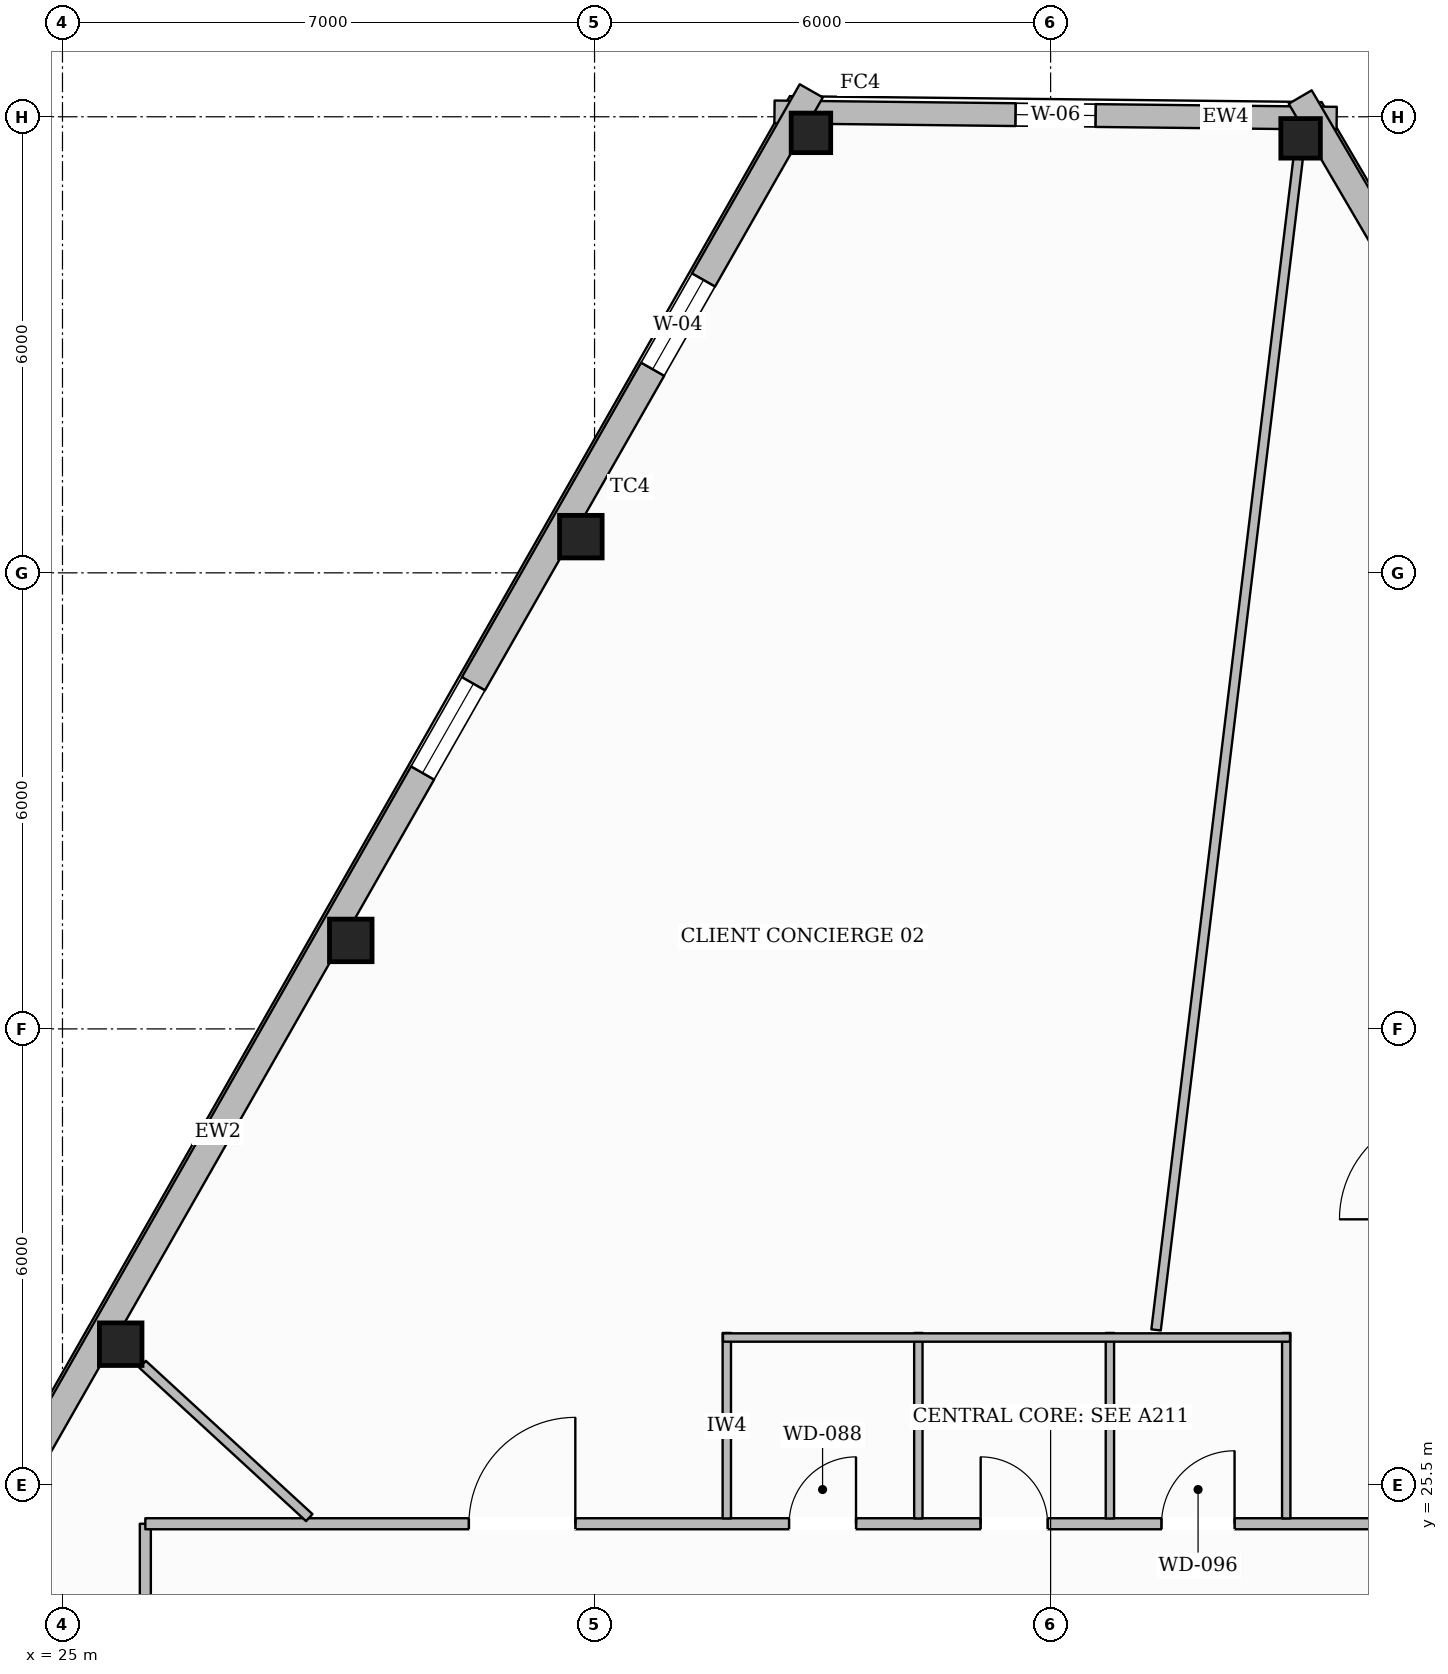
"""IFC4 building model, lengths in metres.
Left out: names, types, materials, properties, quantities, classifications, styles, units other than length and angle.
Written with IfcOpenShell. Run it as: python <this file> out.ifc"""

import sys

from ifc_helpers import new_model, si_unit, direction, frame, frame_2d, origin, origin_2d, place, context, subcontext, project, spatial, rectangle, hollow_rectangle, extrude, element, fill, save


model = new_model("IFC4")
c1 = context("Model", 3, precision=1e-05, world=origin(), true_north=direction((0.0, 1.0)))
c2 = subcontext(c1, "Body", "Model", "MODEL_VIEW")
j1 = project(units=[si_unit("LENGTHUNIT", "METRE"), si_unit("PLANEANGLEUNIT", "RADIAN")], contexts=[c1])
p1 = place(None, origin())
s1 = spatial("IfcSite", under=j1, at=p1, CompositionType="ELEMENT")
p2 = place(p1, origin())
s2 = spatial("IfcBuilding", under=s1, at=p2, CompositionType="ELEMENT")
p3 = place(p2, frame((0.0, 0.0, 258.75)))
s3 = spatial("IfcBuildingStorey", under=s2, at=p3, CompositionType="ELEMENT", Elevation=258.75)
p4 = place(p3, frame((34.847, 43.288, 0.0), z_axis=(0.0, 0.0, 1.0), x_axis=(1.0, 0.0, 0.0)))
e1 = element("IfcColumn", 1, at=p4, inside=s3, PredefinedType="COLUMN", context=c2, shape_type="SweptSolid", body=[
    extrude(hollow_rectangle(XDim=0.52, YDim=0.52, WallThickness=0.024, at=origin_2d()), origin(), (0.0, 0.0, 1.0), 3.61),
])
for number, where, z_axis, x_axis in (
    (2, (31.82, 37.976, 0.0), (0.0, 0.0, 1.0), (1.0, 0.0, 0.0)),
    (3, (28.793, 32.664, 0.0), (0.0, 0.0, 1.0), (1.0, 0.0, 0.0)),
    (4, (25.766, 27.352, 0.0), (0.0, 0.0, 1.0), (1.0, 0.0, 0.0)),
):
    element("IfcColumn", number, at=place(p3, frame(where, z_axis=z_axis, x_axis=x_axis)), inside=s3, PredefinedType="COLUMN", context=c2, shape_type="SweptSolid", body=[
        extrude(hollow_rectangle(XDim=0.56, YDim=0.56, WallThickness=0.025, at=origin_2d()), origin(), (0.0, 0.0, 1.0), 3.61),
    ])
p5 = place(p3, frame((41.289, 43.216, 0.0), z_axis=(0.0, 0.0, 1.0), x_axis=(1.0, 0.0, 0.0)))
e5 = element("IfcColumn", 5, at=p5, inside=s3, PredefinedType="COLUMN", context=c2, shape_type="SweptSolid", body=[
    extrude(hollow_rectangle(XDim=0.52, YDim=0.52, WallThickness=0.024, at=origin_2d()), origin(), (0.0, 0.0, 1.0), 3.61),
])
p6 = place(p3, frame((34.367, 43.564, 0.0), z_axis=(0.0, 0.0, 1.0), x_axis=(0.999937028375, -0.011222267359, 0.0)))
e6 = element("IfcWall", 6, at=p6, inside=s3, PredefinedType="STANDARD", context=c2, shape_type="SweptSolid", body=[
    extrude(rectangle(XDim=7.397, YDim=0.3, at=frame_2d((3.698, 0.0))), origin(), (0.0, 0.0, 1.0), 3.196),
])
p7 = place(p6, frame((3.173, 0.0, 0.65)))
e7 = element("IfcOpeningElement", 7, at=p7, cuts=e6, PredefinedType="OPENING", context=c2, shape_type="SweptSolid", body=[
    extrude(rectangle(XDim=1.05, YDim=1.7, at=frame_2d((0.525, 0.85))), frame((0.0, 0.16, 0.0), z_axis=(0.0, -1.0, 0.0), x_axis=(1.0, 0.0, 0.0)), (0.0, 0.0, 1.0), 0.32),
])
p8 = place(p3, frame((16.214, 11.135, 0.0), z_axis=(0.0, 0.0, 1.0), x_axis=(0.49510347201, 0.868834018673, 0.0)))
e8 = element("IfcWall", 8, at=p8, inside=s3, PredefinedType="STANDARD", context=c2, shape_type="SweptSolid", body=[
    extrude(rectangle(XDim=37.643, YDim=0.35, at=frame_2d((18.822, 0.0))), origin(), (0.0, 0.0, 1.0), 3.196),
])
p9 = place(p8, frame((33.429, 0.0, 0.65)))
e9 = element("IfcOpeningElement", 9, at=p9, cuts=e8, PredefinedType="OPENING", context=c2, shape_type="SweptSolid", body=[
    extrude(rectangle(XDim=1.35, YDim=1.75, at=frame_2d((0.675, 0.875))), frame((0.0, 0.185, 0.0), z_axis=(0.0, -1.0, 0.0), x_axis=(1.0, 0.0, 0.0)), (0.0, 0.0, 1.0), 0.37),
])
p10 = place(p8, frame((27.315, 0.0, 0.65)))
e10 = element("IfcOpeningElement", 10, at=p10, cuts=e8, PredefinedType="OPENING", context=c2, shape_type="SweptSolid", body=[
    extrude(rectangle(XDim=1.35, YDim=1.75, at=frame_2d((0.675, 0.875))), frame((0.0, 0.185, 0.0), z_axis=(0.0, -1.0, 0.0), x_axis=(1.0, 0.0, 0.0)), (0.0, 0.0, 1.0), 0.37),
])
p11 = place(p8, frame((15.087, 0.0, 0.65)))
e11 = element("IfcOpeningElement", 11, at=p11, cuts=e8, PredefinedType="OPENING", context=c2, shape_type="SweptSolid", body=[
    extrude(rectangle(XDim=1.35, YDim=1.75, at=frame_2d((0.675, 0.875))), frame((0.0, 0.185, 0.0), z_axis=(0.0, -1.0, 0.0), x_axis=(1.0, 0.0, 0.0)), (0.0, 0.0, 1.0), 0.37),
])
p12 = place(p8, frame((8.973, 0.0, 0.65)))
e12 = element("IfcOpeningElement", 12, at=p12, cuts=e8, PredefinedType="OPENING", context=c2, shape_type="SweptSolid", body=[
    extrude(rectangle(XDim=1.35, YDim=1.75, at=frame_2d((0.675, 0.875))), frame((0.0, 0.185, 0.0), z_axis=(0.0, -1.0, 0.0), x_axis=(1.0, 0.0, 0.0)), (0.0, 0.0, 1.0), 0.37),
])
p13 = place(p8, frame((2.859, 0.0, 0.65)))
e13 = element("IfcOpeningElement", 13, at=p13, cuts=e8, PredefinedType="OPENING", context=c2, shape_type="SweptSolid", body=[
    extrude(rectangle(XDim=1.35, YDim=1.75, at=frame_2d((0.675, 0.875))), frame((0.0, 0.185, 0.0), z_axis=(0.0, -1.0, 0.0), x_axis=(1.0, 0.0, 0.0)), (0.0, 0.0, 1.0), 0.37),
])
p14 = place(p3, frame((41.284, 43.76, 0.0), z_axis=(0.0, 0.0, 1.0), x_axis=(0.50479404613, -0.863239810824, 0.0)))
e14 = element("IfcWall", 14, at=p14, inside=s3, PredefinedType="STANDARD", context=c2, shape_type="SweptSolid", body=[
    extrude(rectangle(XDim=38.372, YDim=0.35, at=frame_2d((19.186, 0.0))), origin(), (0.0, 0.0, 1.0), 3.196),
])
p15 = place(p14, frame((34.102, 0.0, 0.65)))
e15 = element("IfcOpeningElement", 15, at=p15, cuts=e14, PredefinedType="OPENING", context=c2, shape_type="SweptSolid", body=[
    extrude(rectangle(XDim=1.35, YDim=1.75, at=frame_2d((0.675, 0.875))), frame((0.0, 0.185, 0.0), z_axis=(0.0, -1.0, 0.0), x_axis=(1.0, 0.0, 0.0)), (0.0, 0.0, 1.0), 0.37),
])
p16 = place(p14, frame((27.864, 0.0, 0.65)))
e16 = element("IfcOpeningElement", 16, at=p16, cuts=e14, PredefinedType="OPENING", context=c2, shape_type="SweptSolid", body=[
    extrude(rectangle(XDim=1.35, YDim=1.75, at=frame_2d((0.675, 0.875))), frame((0.0, 0.185, 0.0), z_axis=(0.0, -1.0, 0.0), x_axis=(1.0, 0.0, 0.0)), (0.0, 0.0, 1.0), 0.37),
])
p17 = place(p14, frame((15.39, 0.0, 0.65)))
e17 = element("IfcOpeningElement", 17, at=p17, cuts=e14, PredefinedType="OPENING", context=c2, shape_type="SweptSolid", body=[
    extrude(rectangle(XDim=1.35, YDim=1.75, at=frame_2d((0.675, 0.875))), frame((0.0, 0.185, 0.0), z_axis=(0.0, -1.0, 0.0), x_axis=(1.0, 0.0, 0.0)), (0.0, 0.0, 1.0), 0.37),
])
p18 = place(p14, frame((9.153, 0.0, 0.65)))
e18 = element("IfcOpeningElement", 18, at=p18, cuts=e14, PredefinedType="OPENING", context=c2, shape_type="SweptSolid", body=[
    extrude(rectangle(XDim=1.35, YDim=1.75, at=frame_2d((0.675, 0.875))), frame((0.0, 0.185, 0.0), z_axis=(0.0, -1.0, 0.0), x_axis=(1.0, 0.0, 0.0)), (0.0, 0.0, 1.0), 0.37),
])
p19 = place(p14, frame((2.915, 0.0, 0.65)))
e19 = element("IfcOpeningElement", 19, at=p19, cuts=e14, PredefinedType="OPENING", context=c2, shape_type="SweptSolid", body=[
    extrude(rectangle(XDim=1.35, YDim=1.75, at=frame_2d((0.675, 0.875))), frame((0.0, 0.185, 0.0), z_axis=(0.0, -1.0, 0.0), x_axis=(1.0, 0.0, 0.0)), (0.0, 0.0, 1.0), 0.37),
])
p20 = place(p3, frame((26.09, 7.21, 0.0), z_axis=(0.0, 0.0, 1.0), x_axis=(0.0, 1.0, 0.0)))
e20 = element("IfcWall", 20, at=p20, inside=s3, PredefinedType="PARTITIONING", context=c2, shape_type="SweptSolid", body=[
    extrude(rectangle(XDim=17.78, YDim=0.145, at=frame_2d((8.89, 0.0))), origin(), (0.0, 0.0, 1.0), 3.349),
])
p21 = place(p20, frame((11.443, 0.0, 0.0)))
e21 = element("IfcOpeningElement", 21, at=p21, cuts=e20, PredefinedType="OPENING", context=c2, shape_type="SweptSolid", body=[
    extrude(rectangle(XDim=0.98, YDim=2.15, at=frame_2d((0.49, 1.075))), frame((0.0, 0.083, 0.0), z_axis=(0.0, -1.0, 0.0), x_axis=(1.0, 0.0, 0.0)), (0.0, 0.0, 1.0), 0.165),
])
p22 = place(p3, frame((26.09, 24.99, 0.0), z_axis=(0.0, 0.0, 1.0), x_axis=(1.0, 0.0, 0.0)))
e22 = element("IfcWall", 22, at=p22, inside=s3, PredefinedType="PARTITIONING", context=c2, shape_type="SweptSolid", body=[
    extrude(rectangle(XDim=17.11, YDim=0.145, at=frame_2d((8.555, 0.0))), origin(), (0.0, 0.0, 1.0), 3.61),
])
p23 = place(p22, frame((8.47, 0.0, 0.0)))
e23 = element("IfcOpeningElement", 23, at=p23, cuts=e22, PredefinedType="OPENING", context=c2, shape_type="SweptSolid", body=[
    extrude(rectangle(XDim=0.88, YDim=2.1, at=frame_2d((0.44, 1.05))), frame((0.0, 0.083, 0.0), z_axis=(0.0, -1.0, 0.0), x_axis=(1.0, 0.0, 0.0)), (0.0, 0.0, 1.0), 0.165),
])
p24 = place(p22, frame((10.99, 0.0, 0.0)))
e24 = element("IfcOpeningElement", 24, at=p24, cuts=e22, PredefinedType="OPENING", context=c2, shape_type="SweptSolid", body=[
    extrude(rectangle(XDim=0.88, YDim=2.1, at=frame_2d((0.44, 1.05))), frame((0.0, 0.083, 0.0), z_axis=(0.0, -1.0, 0.0), x_axis=(1.0, 0.0, 0.0)), (0.0, 0.0, 1.0), 0.165),
])
p25 = place(p22, frame((13.37, 0.0, 0.0)))
e25 = element("IfcOpeningElement", 25, at=p25, cuts=e22, PredefinedType="OPENING", context=c2, shape_type="SweptSolid", body=[
    extrude(rectangle(XDim=0.96, YDim=2.1, at=frame_2d((0.48, 1.05))), frame((0.0, 0.083, 0.0), z_axis=(0.0, -1.0, 0.0), x_axis=(1.0, 0.0, 0.0)), (0.0, 0.0, 1.0), 0.165),
])
p26 = place(p22, frame((4.257, 0.0, 0.0)))
e26 = element("IfcOpeningElement", 26, at=p26, cuts=e22, PredefinedType="OPENING", context=c2, shape_type="SweptSolid", body=[
    extrude(rectangle(XDim=1.4, YDim=2.2, at=frame_2d((0.7, 1.1))), frame((0.0, 0.083, 0.0), z_axis=(0.0, -1.0, 0.0), x_axis=(1.0, 0.0, 0.0)), (0.0, 0.0, 1.0), 0.165),
])
for number, where, z_axis, x_axis in (
    (27, (33.74, 25.06, 0.0), (0.0, 0.0, 1.0), (0.0, 1.0, 0.0)),
    (28, (36.26, 25.06, 0.0), (0.0, 0.0, 1.0), (0.0, 1.0, 0.0)),
    (29, (38.78, 25.06, 0.0), (0.0, 0.0, 1.0), (0.0, 1.0, 0.0)),
    (30, (41.1, 25.06, 0.0), (0.0, 0.0, 1.0), (0.0, 1.0, 0.0)),
):
    element("IfcWall", number, at=place(p3, frame(where, z_axis=z_axis, x_axis=x_axis)), inside=s3, PredefinedType="PLUMBINGWALL", context=c2, shape_type="SweptSolid", body=[
        extrude(rectangle(XDim=2.44, YDim=0.11, at=frame_2d((1.22, 0.0))), origin(), (0.0, 0.0, 1.0), 3.61),
    ])
p27 = place(p3, frame((33.69, 27.44, 0.0), z_axis=(0.0, 0.0, 1.0), x_axis=(1.0, 0.0, 0.0)))
e31 = element("IfcWall", 31, at=p27, inside=s3, PredefinedType="PLUMBINGWALL", context=c2, shape_type="SweptSolid", body=[
    extrude(rectangle(XDim=7.46, YDim=0.11, at=frame_2d((3.73, 0.0))), origin(), (0.0, 0.0, 1.0), 3.61),
])
p28 = place(p3, frame((39.387, 27.54, 0.0), z_axis=(0.0, 0.0, 1.0), x_axis=(0.12041169592, 0.99272404196, 0.0)))
e32 = element("IfcWall", 32, at=p28, inside=s3, PredefinedType="PARTITIONING", context=c2, shape_type="SweptSolid", body=[
    extrude(rectangle(XDim=15.521, YDim=0.125, at=frame_2d((7.76, 0.0))), origin(), (0.0, 0.0, 1.0), 3.246),
])
p29 = place(p3, frame((28.247, 25.071, 0.0), z_axis=(0.0, 0.0, 1.0), x_axis=(-0.736030630255, 0.67694823386, 0.0)))
e33 = element("IfcWall", 33, at=p29, inside=s3, PredefinedType="PARTITIONING", context=c2, shape_type="SweptSolid", body=[
    extrude(rectangle(XDim=2.979, YDim=0.125, at=frame_2d((1.49, 0.0))), origin(), (0.0, 0.0, 1.0), 3.61),
])
p30 = place(p9, origin())
e34 = element("IfcWindow", 34, at=p30, inside=s3, PartitioningType="SINGLE_PANEL", PredefinedType="WINDOW", context=c2, shape_type="SweptSolid", body=[
    extrude(rectangle(XDim=1.35, YDim=1.75, at=frame_2d((0.675, 0.875))), frame((0.0, 0.03, 0.0), z_axis=(0.0, -1.0, 0.0), x_axis=(1.0, 0.0, 0.0)), (0.0, 0.0, 1.0), 0.06),
])
fill(e9, e34)
p31 = place(p10, origin())
e35 = element("IfcWindow", 35, at=p31, inside=s3, PartitioningType="SINGLE_PANEL", PredefinedType="WINDOW", context=c2, shape_type="SweptSolid", body=[
    extrude(rectangle(XDim=1.35, YDim=1.75, at=frame_2d((0.675, 0.875))), frame((0.0, 0.03, 0.0), z_axis=(0.0, -1.0, 0.0), x_axis=(1.0, 0.0, 0.0)), (0.0, 0.0, 1.0), 0.06),
])
fill(e10, e35)
p32 = place(p7, origin())
e36 = element("IfcWindow", 36, at=p32, inside=s3, PartitioningType="SINGLE_PANEL", PredefinedType="WINDOW", context=c2, shape_type="SweptSolid", body=[
    extrude(rectangle(XDim=1.05, YDim=1.7, at=frame_2d((0.525, 0.85))), frame((0.0, 0.03, 0.0), z_axis=(0.0, -1.0, 0.0), x_axis=(1.0, 0.0, 0.0)), (0.0, 0.0, 1.0), 0.06),
])
fill(e7, e36)
p33 = place(p23, origin())
e37 = element("IfcDoor", 37, at=p33, inside=s3, OperationType="SINGLE_SWING_RIGHT", PredefinedType="DOOR", context=c2, shape_type="SweptSolid", body=[
    extrude(rectangle(XDim=0.88, YDim=2.1, at=frame_2d((0.44, 1.05))), frame((0.0, 0.025, 0.0), z_axis=(0.0, -1.0, 0.0), x_axis=(1.0, 0.0, 0.0)), (0.0, 0.0, 1.0), 0.05),
])
fill(e23, e37)
p34 = place(p24, origin())
e38 = element("IfcDoor", 38, at=p34, inside=s3, OperationType="SINGLE_SWING_LEFT", PredefinedType="DOOR", context=c2, shape_type="SweptSolid", body=[
    extrude(rectangle(XDim=0.88, YDim=2.1, at=frame_2d((0.44, 1.05))), frame((0.0, 0.025, 0.0), z_axis=(0.0, -1.0, 0.0), x_axis=(1.0, 0.0, 0.0)), (0.0, 0.0, 1.0), 0.05),
])
fill(e24, e38)
p35 = place(p25, origin())
e39 = element("IfcDoor", 39, at=p35, inside=s3, OperationType="SINGLE_SWING_RIGHT", PredefinedType="DOOR", context=c2, shape_type="SweptSolid", body=[
    extrude(rectangle(XDim=0.96, YDim=2.1, at=frame_2d((0.48, 1.05))), frame((0.0, 0.025, 0.0), z_axis=(0.0, -1.0, 0.0), x_axis=(1.0, 0.0, 0.0)), (0.0, 0.0, 1.0), 0.05),
])
fill(e25, e39)
p36 = place(p26, origin())
e40 = element("IfcDoor", 40, at=p36, inside=s3, OperationType="SINGLE_SWING_RIGHT", PredefinedType="DOOR", context=c2, shape_type="SweptSolid", body=[
    extrude(rectangle(XDim=1.4, YDim=2.2, at=frame_2d((0.7, 1.1))), frame((0.0, 0.025, 0.0), z_axis=(0.0, -1.0, 0.0), x_axis=(1.0, 0.0, 0.0)), (0.0, 0.0, 1.0), 0.05),
])
fill(e26, e40)
save(model, sys.argv[1])
